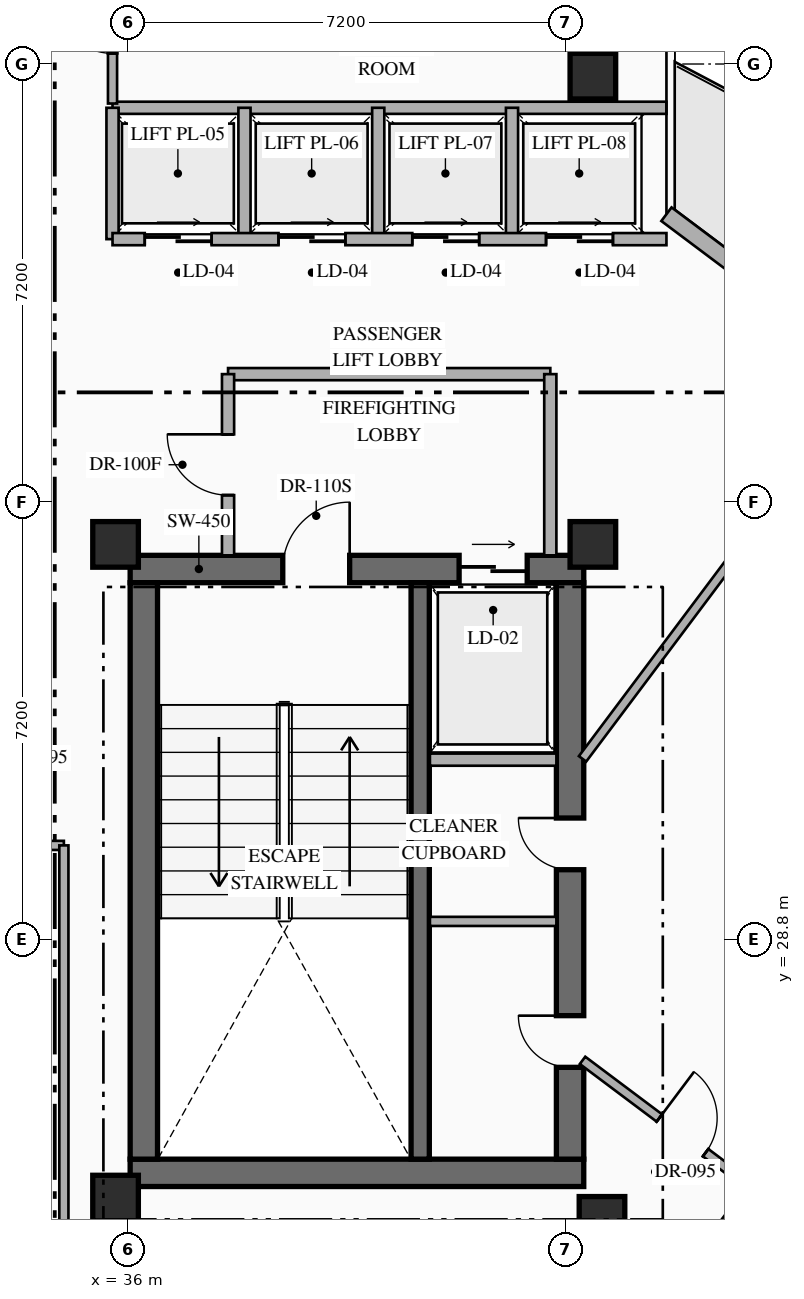
"""IFC4 building model, lengths in metres.
Left out: names, types, materials, properties, quantities, classifications, styles, units other than length and angle.
Written with IfcOpenShell. Run it as: python <this file> out.ifc"""

import sys

from ifc_helpers import new_model, si_unit, direction, frame, frame_2d, origin, origin_2d, place, context, subcontext, project, spatial, rectangle, hollow_rectangle, extrude, element, fill, save


model = new_model("IFC4")
c1 = context("Model", 3, precision=1e-05, world=origin(), true_north=direction((0.0, 1.0)))
c2 = subcontext(c1, "Body", "Model", "MODEL_VIEW")
j1 = project(units=[si_unit("LENGTHUNIT", "METRE"), si_unit("PLANEANGLEUNIT", "RADIAN")], contexts=[c1])
p1 = place(None, origin())
s1 = spatial("IfcSite", under=j1, at=p1, CompositionType="ELEMENT")
p2 = place(p1, origin())
s2 = spatial("IfcBuilding", under=s1, at=p2, CompositionType="ELEMENT")
p3 = place(p2, frame((0.0, 0.0, 209.55)))
s3 = spatial("IfcBuildingStorey", under=s2, at=p3, CompositionType="ELEMENT", Elevation=209.55)
p4 = place(p3, frame((36.04, 24.965, 0.0), z_axis=(0.0, 0.0, 1.0), x_axis=(1.0, 0.0, 0.0)))
e1 = element("IfcWall", 1, at=p4, inside=s3, PredefinedType="SHEAR", context=c2, shape_type="SweptSolid", body=[
    extrude(rectangle(XDim=7.46, YDim=0.45, at=frame_2d((3.73, 0.0))), origin(), (0.0, 0.0, 1.0), 3.6),
])
p5 = place(p3, frame((36.04, 34.895, 0.0), z_axis=(0.0, 0.0, 1.0), x_axis=(1.0, 0.0, 0.0)))
e2 = element("IfcWall", 2, at=p5, inside=s3, PredefinedType="SHEAR", context=c2, shape_type="SweptSolid", body=[
    extrude(rectangle(XDim=7.46, YDim=0.45, at=frame_2d((3.73, 0.0))), origin(), (0.0, 0.0, 1.0), 3.6),
])
p6 = place(p5, frame((2.51, 0.0, 0.0)))
e3 = element("IfcOpeningElement", 3, at=p6, cuts=e2, PredefinedType="OPENING", context=c2, shape_type="SweptSolid", body=[
    extrude(rectangle(XDim=1.1, YDim=2.2, at=frame_2d((0.55, 1.1))), frame((0.0, 0.235, 0.0), z_axis=(0.0, -1.0, 0.0), x_axis=(1.0, 0.0, 0.0)), (0.0, 0.0, 1.0), 0.47),
])
p7 = place(p5, frame((5.41, 0.0, 0.0)))
e4 = element("IfcOpeningElement", 4, at=p7, cuts=e2, PredefinedType="OPENING", context=c2, shape_type="SweptSolid", body=[
    extrude(rectangle(XDim=1.12, YDim=2.15, at=frame_2d((0.56, 1.075))), frame((0.0, 0.235, 0.0), z_axis=(0.0, -1.0, 0.0), x_axis=(1.0, 0.0, 0.0)), (0.0, 0.0, 1.0), 0.47),
])
p8 = place(p3, frame((36.265, 25.19, 0.0), z_axis=(0.0, 0.0, 1.0), x_axis=(0.0, 1.0, 0.0)))
e5 = element("IfcWall", 5, at=p8, inside=s3, PredefinedType="SHEAR", context=c2, shape_type="SweptSolid", body=[
    extrude(rectangle(XDim=9.48, YDim=0.45, at=frame_2d((4.74, 0.0))), origin(), (0.0, 0.0, 1.0), 3.6),
])
p9 = place(p3, frame((43.275, 25.19, 0.0), z_axis=(0.0, 0.0, 1.0), x_axis=(0.0, 1.0, 0.0)))
e6 = element("IfcWall", 6, at=p9, inside=s3, PredefinedType="SHEAR", context=c2, shape_type="SweptSolid", body=[
    extrude(rectangle(XDim=9.48, YDim=0.45, at=frame_2d((4.74, 0.0))), origin(), (0.0, 0.0, 1.0), 3.6),
])
p10 = place(p9, frame((1.51, 0.0, 0.0)))
e7 = element("IfcOpeningElement", 7, at=p10, cuts=e6, PredefinedType="OPENING", context=c2, shape_type="SweptSolid", body=[
    extrude(rectangle(XDim=0.85, YDim=2.08, at=frame_2d((0.425, 1.04))), frame((0.0, 0.235, 0.0), z_axis=(0.0, -1.0, 0.0), x_axis=(1.0, 0.0, 0.0)), (0.0, 0.0, 1.0), 0.47),
])
p11 = place(p9, frame((4.76, 0.0, 0.0)))
e8 = element("IfcOpeningElement", 8, at=p11, cuts=e6, PredefinedType="OPENING", context=c2, shape_type="SweptSolid", body=[
    extrude(rectangle(XDim=0.85, YDim=2.08, at=frame_2d((0.425, 1.04))), frame((0.0, 0.235, 0.0), z_axis=(0.0, -1.0, 0.0), x_axis=(1.0, 0.0, 0.0)), (0.0, 0.0, 1.0), 0.47),
])
p12 = place(p3, frame((40.81, 25.19, 0.0), z_axis=(0.0, 0.0, 1.0), x_axis=(0.0, 1.0, 0.0)))
e9 = element("IfcWall", 9, at=p12, inside=s3, PredefinedType="SHEAR", context=c2, shape_type="SweptSolid", body=[
    extrude(rectangle(XDim=9.48, YDim=0.3, at=frame_2d((4.74, 0.0))), origin(), (0.0, 0.0, 1.0), 3.6),
])
for number, where, z_axis, x_axis in (
    (10, (35.8, 24.55, 0.0), (0.0, 0.0, 1.0), (1.0, 0.0, 0.0)),
    (11, (43.8, 24.2, 0.0), (0.0, 0.0, 1.0), (1.0, 0.0, 0.0)),
    (12, (35.8, 35.3, 0.0), (0.0, 0.0, 1.0), (1.0, 0.0, 0.0)),
    (13, (43.65, 35.3, 0.0), (0.0, 0.0, 1.0), (1.0, 0.0, 0.0)),
    (14, (43.65, 43.0, 0.0), (0.0, 0.0, 1.0), (1.0, 0.0, 0.0)),
):
    element("IfcColumn", number, at=place(p3, frame(where, z_axis=z_axis, x_axis=x_axis)), inside=s3, PredefinedType="COLUMN", context=c2, shape_type="SweptSolid", body=[
        extrude(hollow_rectangle(XDim=0.75, YDim=0.75, WallThickness=0.028, at=origin_2d()), origin(), (0.0, 0.0, 1.0), 3.6),
    ])
p13 = place(p3, frame((44.86, 40.73, 0.0), z_axis=(0.0, 0.0, 1.0), x_axis=(0.800007624502, -0.599989833863, 0.0)))
e15 = element("IfcWall", 15, at=p13, inside=s3, PredefinedType="STANDARD", context=c2, shape_type="SweptSolid", body=[
    extrude(rectangle(XDim=19.212, YDim=0.28, at=frame_2d((9.606, 0.0))), origin(), (0.0, 0.0, 1.0), 3.35),
])
p14 = place(p13, frame((1.755, 0.0, 0.0)))
e16 = element("IfcOpeningElement", 16, at=p14, cuts=e15, PredefinedType="OPENING", context=c2, shape_type="SweptSolid", body=[
    extrude(rectangle(XDim=1.1, YDim=2.2, at=frame_2d((0.55, 1.1))), frame((0.0, 0.15, 0.0), z_axis=(0.0, -1.0, 0.0), x_axis=(1.0, 0.0, 0.0)), (0.0, 0.0, 1.0), 0.3),
])
p15 = place(p13, frame((13.509, 0.0, 0.85)))
e17 = element("IfcOpeningElement", 17, at=p15, cuts=e15, PredefinedType="OPENING", context=c2, shape_type="SweptSolid", body=[
    extrude(rectangle(XDim=1.8, YDim=2.1, at=frame_2d((0.9, 1.05))), frame((0.0, 0.15, 0.0), z_axis=(0.0, -1.0, 0.0), x_axis=(1.0, 0.0, 0.0)), (0.0, 0.0, 1.0), 0.3),
])
p16 = place(p3, frame((40.97, 31.76, 0.0), z_axis=(0.0, 0.0, 1.0), x_axis=(1.0, 0.0, 0.0)))
e18 = element("IfcWall", 18, at=p16, inside=s3, PredefinedType="STANDARD", context=c2, shape_type="SweptSolid", body=[
    extrude(rectangle(XDim=2.08, YDim=0.2, at=frame_2d((1.04, 0.0))), origin(), (0.0, 0.0, 1.0), 3.35),
])
p17 = place(p3, frame((40.97, 29.1, 0.0), z_axis=(0.0, 0.0, 1.0), x_axis=(1.0, 0.0, 0.0)))
e19 = element("IfcWall", 19, at=p17, inside=s3, PredefinedType="PARTITIONING", context=c2, shape_type="SweptSolid", body=[
    extrude(rectangle(XDim=2.08, YDim=0.15, at=frame_2d((1.04, 0.0))), origin(), (0.0, 0.0, 1.0), 3.35),
])
p18 = place(p3, frame((37.65, 38.1, 0.0), z_axis=(0.0, 0.0, 1.0), x_axis=(1.0, 0.0, 0.0)))
e20 = element("IfcWall", 20, at=p18, inside=s3, PredefinedType="STANDARD", context=c2, shape_type="SweptSolid", body=[
    extrude(rectangle(XDim=5.3, YDim=0.2, at=frame_2d((2.65, 0.0))), origin(), (0.0, 0.0, 1.0), 3.35),
])
p19 = place(p3, frame((42.95, 35.12, 0.0), z_axis=(0.0, 0.0, 1.0), x_axis=(0.0, 1.0, 0.0)))
e21 = element("IfcWall", 21, at=p19, inside=s3, PredefinedType="STANDARD", context=c2, shape_type="SweptSolid", body=[
    extrude(rectangle(XDim=2.98, YDim=0.2, at=frame_2d((1.49, 0.0))), origin(), (0.0, 0.0, 1.0), 3.35),
])
p20 = place(p3, frame((37.65, 35.12, 0.0), z_axis=(0.0, 0.0, 1.0), x_axis=(0.0, 1.0, 0.0)))
e22 = element("IfcWall", 22, at=p20, inside=s3, PredefinedType="STANDARD", context=c2, shape_type="SweptSolid", body=[
    extrude(rectangle(XDim=2.98, YDim=0.2, at=frame_2d((1.49, 0.0))), origin(), (0.0, 0.0, 1.0), 3.35),
])
p21 = place(p20, frame((0.99, 0.0, 0.0)))
e23 = element("IfcOpeningElement", 23, at=p21, cuts=e22, PredefinedType="OPENING", context=c2, shape_type="SweptSolid", body=[
    extrude(rectangle(XDim=1.0, YDim=2.2, at=frame_2d((0.5, 1.1))), frame((0.0, 0.11, 0.0), z_axis=(0.0, -1.0, 0.0), x_axis=(1.0, 0.0, 0.0)), (0.0, 0.0, 1.0), 0.22),
])
p22 = place(p3, frame((35.75, 42.48, 0.0), z_axis=(0.0, 0.0, 1.0), x_axis=(1.0, 0.0, 0.0)))
e24 = element("IfcWall", 24, at=p22, inside=s3, PredefinedType="STANDARD", context=c2, shape_type="SweptSolid", body=[
    extrude(rectangle(XDim=9.11, YDim=0.2, at=frame_2d((4.555, 0.0))), origin(), (0.0, 0.0, 1.0), 3.35),
])
for number, where, z_axis, x_axis in (
    (25, (35.75, 40.32, 0.0), (0.0, 0.0, 1.0), (0.0, 1.0, 0.0)),
    (26, (37.92, 40.32, 0.0), (0.0, 0.0, 1.0), (0.0, 1.0, 0.0)),
    (27, (40.12, 40.32, 0.0), (0.0, 0.0, 1.0), (0.0, 1.0, 0.0)),
    (28, (42.32, 40.32, 0.0), (0.0, 0.0, 1.0), (0.0, 1.0, 0.0)),
):
    element("IfcWall", number, at=place(p3, frame(where, z_axis=z_axis, x_axis=x_axis)), inside=s3, PredefinedType="STANDARD", context=c2, shape_type="SweptSolid", body=[
        extrude(rectangle(XDim=2.16, YDim=0.2, at=frame_2d((1.08, 0.0))), origin(), (0.0, 0.0, 1.0), 3.35),
    ])
p23 = place(p3, frame((35.75, 40.32, 0.0), z_axis=(0.0, 0.0, 1.0), x_axis=(1.0, 0.0, 0.0)))
e29 = element("IfcWall", 29, at=p23, inside=s3, PredefinedType="STANDARD", context=c2, shape_type="SweptSolid", body=[
    extrude(rectangle(XDim=9.11, YDim=0.2, at=frame_2d((4.555, 0.0))), origin(), (0.0, 0.0, 1.0), 3.35),
])
p24 = place(p23, frame((0.53, 0.0, 0.0)))
e30 = element("IfcOpeningElement", 30, at=p24, cuts=e29, PredefinedType="OPENING", context=c2, shape_type="SweptSolid", body=[
    extrude(rectangle(XDim=1.1, YDim=2.18, at=frame_2d((0.55, 1.09))), frame((0.0, 0.11, 0.0), z_axis=(0.0, -1.0, 0.0), x_axis=(1.0, 0.0, 0.0)), (0.0, 0.0, 1.0), 0.22),
])
p25 = place(p23, frame((2.73, 0.0, 0.0)))
e31 = element("IfcOpeningElement", 31, at=p25, cuts=e29, PredefinedType="OPENING", context=c2, shape_type="SweptSolid", body=[
    extrude(rectangle(XDim=1.1, YDim=2.18, at=frame_2d((0.55, 1.09))), frame((0.0, 0.11, 0.0), z_axis=(0.0, -1.0, 0.0), x_axis=(1.0, 0.0, 0.0)), (0.0, 0.0, 1.0), 0.22),
])
p26 = place(p23, frame((4.93, 0.0, 0.0)))
e32 = element("IfcOpeningElement", 32, at=p26, cuts=e29, PredefinedType="OPENING", context=c2, shape_type="SweptSolid", body=[
    extrude(rectangle(XDim=1.1, YDim=2.18, at=frame_2d((0.55, 1.09))), frame((0.0, 0.11, 0.0), z_axis=(0.0, -1.0, 0.0), x_axis=(1.0, 0.0, 0.0)), (0.0, 0.0, 1.0), 0.22),
])
p27 = place(p23, frame((7.13, 0.0, 0.0)))
e33 = element("IfcOpeningElement", 33, at=p27, cuts=e29, PredefinedType="OPENING", context=c2, shape_type="SweptSolid", body=[
    extrude(rectangle(XDim=1.1, YDim=2.18, at=frame_2d((0.55, 1.09))), frame((0.0, 0.11, 0.0), z_axis=(0.0, -1.0, 0.0), x_axis=(1.0, 0.0, 0.0)), (0.0, 0.0, 1.0), 0.22),
])
p28 = place(p3, frame((30.5, 30.35, 0.0), z_axis=(0.0, 0.0, 1.0), x_axis=(1.0, 0.0, 0.0)))
e34 = element("IfcWall", 34, at=p28, inside=s3, PredefinedType="PARTITIONING", context=c2, shape_type="SweptSolid", body=[
    extrude(rectangle(XDim=4.45, YDim=0.15, at=frame_2d((2.225, 0.0))), origin(), (0.0, 0.0, 1.0), 3.35),
])
p29 = place(p28, frame((2.846, 0.0, 0.0)))
e35 = element("IfcOpeningElement", 35, at=p29, cuts=e34, PredefinedType="OPENING", context=c2, shape_type="SweptSolid", body=[
    extrude(rectangle(XDim=0.95, YDim=2.15, at=frame_2d((0.475, 1.075))), frame((0.0, 0.085, 0.0), z_axis=(0.0, -1.0, 0.0), x_axis=(1.0, 0.0, 0.0)), (0.0, 0.0, 1.0), 0.17),
])
p30 = place(p3, frame((34.95, 23.2, 0.0), z_axis=(0.0, 0.0, 1.0), x_axis=(0.0, 1.0, 0.0)))
e36 = element("IfcWall", 36, at=p30, inside=s3, PredefinedType="PARTITIONING", context=c2, shape_type="SweptSolid", body=[
    extrude(rectangle(XDim=7.15, YDim=0.15, at=frame_2d((3.575, 0.0))), origin(), (0.0, 0.0, 1.0), 3.35),
])
p31 = place(p3, frame((43.68, 21.29, 0.0), z_axis=(0.0, 0.0, 1.0), x_axis=(0.600018601461, 0.799986048566, 0.0)))
e37 = element("IfcWall", 37, at=p31, inside=s3, PredefinedType="PARTITIONING", context=c2, shape_type="SweptSolid", body=[
    extrude(rectangle(XDim=4.2, YDim=0.15, at=frame_2d((2.1, 0.0))), origin(), (0.0, 0.0, 1.0), 3.35),
])
p32 = place(p31, frame((0.754, 0.0, 0.0)))
e38 = element("IfcOpeningElement", 38, at=p32, cuts=e37, PredefinedType="OPENING", context=c2, shape_type="SweptSolid", body=[
    extrude(rectangle(XDim=0.95, YDim=2.15, at=frame_2d((0.475, 1.075))), frame((0.0, 0.085, 0.0), z_axis=(0.0, -1.0, 0.0), x_axis=(1.0, 0.0, 0.0)), (0.0, 0.0, 1.0), 0.17),
])
p33 = place(p3, frame((43.48, 26.815, 0.0), z_axis=(0.0, 0.0, 1.0), x_axis=(0.800008430676, -0.599988758934, 0.0)))
e39 = element("IfcWall", 39, at=p33, inside=s3, PredefinedType="PARTITIONING", context=c2, shape_type="SweptSolid", body=[
    extrude(rectangle(XDim=3.475, YDim=0.15, at=frame_2d((1.738, 0.0))), origin(), (0.0, 0.0, 1.0), 3.35),
])
p34 = place(p33, frame((1.58, 0.0, 0.0)))
e40 = element("IfcOpeningElement", 40, at=p34, cuts=e39, PredefinedType="OPENING", context=c2, shape_type="SweptSolid", body=[
    extrude(rectangle(XDim=0.95, YDim=2.15, at=frame_2d((0.475, 1.075))), frame((0.0, 0.085, 0.0), z_axis=(0.0, -1.0, 0.0), x_axis=(1.0, 0.0, 0.0)), (0.0, 0.0, 1.0), 0.17),
])
p35 = place(p3, frame((43.48, 31.773, 0.0), z_axis=(0.0, 0.0, 1.0), x_axis=(0.599971041729, 0.800021717885, 0.0)))
e41 = element("IfcWall", 41, at=p35, inside=s3, PredefinedType="PARTITIONING", context=c2, shape_type="SweptSolid", body=[
    extrude(rectangle(XDim=8.094, YDim=0.15, at=frame_2d((4.047, 0.0))), origin(), (0.0, 0.0, 1.0), 3.35),
])
p36 = place(p3, frame((35.75, 42.55, 0.0), z_axis=(0.0, 0.0, 1.0), x_axis=(0.0, 1.0, 0.0)))
e42 = element("IfcWall", 42, at=p36, inside=s3, PredefinedType="PARTITIONING", context=c2, shape_type="SweptSolid", body=[
    extrude(rectangle(XDim=2.6, YDim=0.15, at=frame_2d((1.3, 0.0))), origin(), (0.0, 0.0, 1.0), 3.35),
])
p37 = place(p36, frame((0.825, 0.0, 0.0)))
e43 = element("IfcOpeningElement", 43, at=p37, cuts=e42, PredefinedType="OPENING", context=c2, shape_type="SweptSolid", body=[
    extrude(rectangle(XDim=0.95, YDim=2.15, at=frame_2d((0.475, 1.075))), frame((0.0, 0.085, 0.0), z_axis=(0.0, -1.0, 0.0), x_axis=(1.0, 0.0, 0.0)), (0.0, 0.0, 1.0), 0.17),
])
p38 = place(p3, frame((27.91, 26.68, 0.0), z_axis=(0.0, 0.0, 1.0), x_axis=(0.800005938517, -0.599992081896, 0.0)))
e44 = element("IfcWall", 44, at=p38, inside=s3, PredefinedType="PARTITIONING", context=c2, shape_type="SweptSolid", body=[
    extrude(rectangle(XDim=14.8, YDim=0.15, at=frame_2d((7.4, 0.0))), origin(), (0.0, 0.0, 1.0), 3.35),
])
p39 = place(p38, frame((9.281, 0.0, 0.0)))
e45 = element("IfcOpeningElement", 45, at=p39, cuts=e44, PredefinedType="OPENING", context=c2, shape_type="SweptSolid", body=[
    extrude(rectangle(XDim=0.95, YDim=2.15, at=frame_2d((0.475, 1.075))), frame((0.0, 0.085, 0.0), z_axis=(0.0, -1.0, 0.0), x_axis=(1.0, 0.0, 0.0)), (0.0, 0.0, 1.0), 0.17),
])
p40 = place(p6, origin())
e46 = element("IfcDoor", 46, at=p40, inside=s3, OperationType="SINGLE_SWING_RIGHT", PredefinedType="DOOR", context=c2, shape_type="SweptSolid", body=[
    extrude(rectangle(XDim=1.1, YDim=2.2, at=frame_2d((0.55, 1.1))), frame((0.0, 0.025, 0.0), z_axis=(0.0, -1.0, 0.0), x_axis=(1.0, 0.0, 0.0)), (0.0, 0.0, 1.0), 0.05),
])
fill(e3, e46)
p41 = place(p7, origin())
e47 = element("IfcDoor", 47, at=p41, inside=s3, OperationType="SLIDING_TO_RIGHT", PredefinedType="USERDEFINED", context=c2, shape_type="SweptSolid", body=[
    extrude(rectangle(XDim=1.12, YDim=2.15, at=frame_2d((0.56, 1.075))), frame((0.0, 0.025, 0.0), z_axis=(0.0, -1.0, 0.0), x_axis=(1.0, 0.0, 0.0)), (0.0, 0.0, 1.0), 0.05),
])
fill(e4, e47)
p42 = place(p10, origin())
e48 = element("IfcDoor", 48, at=p42, inside=s3, OperationType="SINGLE_SWING_RIGHT", PredefinedType="DOOR", context=c2, shape_type="SweptSolid", body=[
    extrude(rectangle(XDim=0.85, YDim=2.08, at=frame_2d((0.425, 1.04))), frame((0.0, 0.025, 0.0), z_axis=(0.0, -1.0, 0.0), x_axis=(1.0, 0.0, 0.0)), (0.0, 0.0, 1.0), 0.05),
])
fill(e7, e48)
p43 = place(p11, origin())
e49 = element("IfcDoor", 49, at=p43, inside=s3, OperationType="SINGLE_SWING_RIGHT", PredefinedType="DOOR", context=c2, shape_type="SweptSolid", body=[
    extrude(rectangle(XDim=0.85, YDim=2.08, at=frame_2d((0.425, 1.04))), frame((0.0, 0.025, 0.0), z_axis=(0.0, -1.0, 0.0), x_axis=(1.0, 0.0, 0.0)), (0.0, 0.0, 1.0), 0.05),
])
fill(e8, e49)
p44 = place(p21, origin())
e50 = element("IfcDoor", 50, at=p44, inside=s3, OperationType="SINGLE_SWING_RIGHT", PredefinedType="DOOR", context=c2, shape_type="SweptSolid", body=[
    extrude(rectangle(XDim=1.0, YDim=2.2, at=frame_2d((0.5, 1.1))), frame((0.0, 0.025, 0.0), z_axis=(0.0, -1.0, 0.0), x_axis=(1.0, 0.0, 0.0)), (0.0, 0.0, 1.0), 0.05),
])
fill(e23, e50)
p45 = place(p24, origin())
e51 = element("IfcDoor", 51, at=p45, inside=s3, OperationType="SLIDING_TO_RIGHT", PredefinedType="USERDEFINED", context=c2, shape_type="SweptSolid", body=[
    extrude(rectangle(XDim=1.1, YDim=2.18, at=frame_2d((0.55, 1.09))), frame((0.0, 0.025, 0.0), z_axis=(0.0, -1.0, 0.0), x_axis=(1.0, 0.0, 0.0)), (0.0, 0.0, 1.0), 0.05),
])
fill(e30, e51)
p46 = place(p25, origin())
e52 = element("IfcDoor", 52, at=p46, inside=s3, OperationType="SLIDING_TO_RIGHT", PredefinedType="USERDEFINED", context=c2, shape_type="SweptSolid", body=[
    extrude(rectangle(XDim=1.1, YDim=2.18, at=frame_2d((0.55, 1.09))), frame((0.0, 0.025, 0.0), z_axis=(0.0, -1.0, 0.0), x_axis=(1.0, 0.0, 0.0)), (0.0, 0.0, 1.0), 0.05),
])
fill(e31, e52)
p47 = place(p26, origin())
e53 = element("IfcDoor", 53, at=p47, inside=s3, OperationType="SLIDING_TO_RIGHT", PredefinedType="USERDEFINED", context=c2, shape_type="SweptSolid", body=[
    extrude(rectangle(XDim=1.1, YDim=2.18, at=frame_2d((0.55, 1.09))), frame((0.0, 0.025, 0.0), z_axis=(0.0, -1.0, 0.0), x_axis=(1.0, 0.0, 0.0)), (0.0, 0.0, 1.0), 0.05),
])
fill(e32, e53)
p48 = place(p27, origin())
e54 = element("IfcDoor", 54, at=p48, inside=s3, OperationType="SLIDING_TO_RIGHT", PredefinedType="USERDEFINED", context=c2, shape_type="SweptSolid", body=[
    extrude(rectangle(XDim=1.1, YDim=2.18, at=frame_2d((0.55, 1.09))), frame((0.0, 0.025, 0.0), z_axis=(0.0, -1.0, 0.0), x_axis=(1.0, 0.0, 0.0)), (0.0, 0.0, 1.0), 0.05),
])
fill(e33, e54)
p49 = place(p34, origin())
e55 = element("IfcDoor", 55, at=p49, inside=s3, OperationType="SINGLE_SWING_LEFT", PredefinedType="DOOR", context=c2, shape_type="SweptSolid", body=[
    extrude(rectangle(XDim=0.95, YDim=2.15, at=frame_2d((0.475, 1.075))), frame((0.0, 0.025, 0.0), z_axis=(0.0, -1.0, 0.0), x_axis=(1.0, 0.0, 0.0)), (0.0, 0.0, 1.0), 0.05),
])
fill(e40, e55)
p50 = place(p37, origin())
e56 = element("IfcDoor", 56, at=p50, inside=s3, OperationType="SINGLE_SWING_RIGHT", PredefinedType="DOOR", context=c2, shape_type="SweptSolid", body=[
    extrude(rectangle(XDim=0.95, YDim=2.15, at=frame_2d((0.475, 1.075))), frame((0.0, 0.025, 0.0), z_axis=(0.0, -1.0, 0.0), x_axis=(1.0, 0.0, 0.0)), (0.0, 0.0, 1.0), 0.05),
])
fill(e43, e56)
save(model, sys.argv[1])
